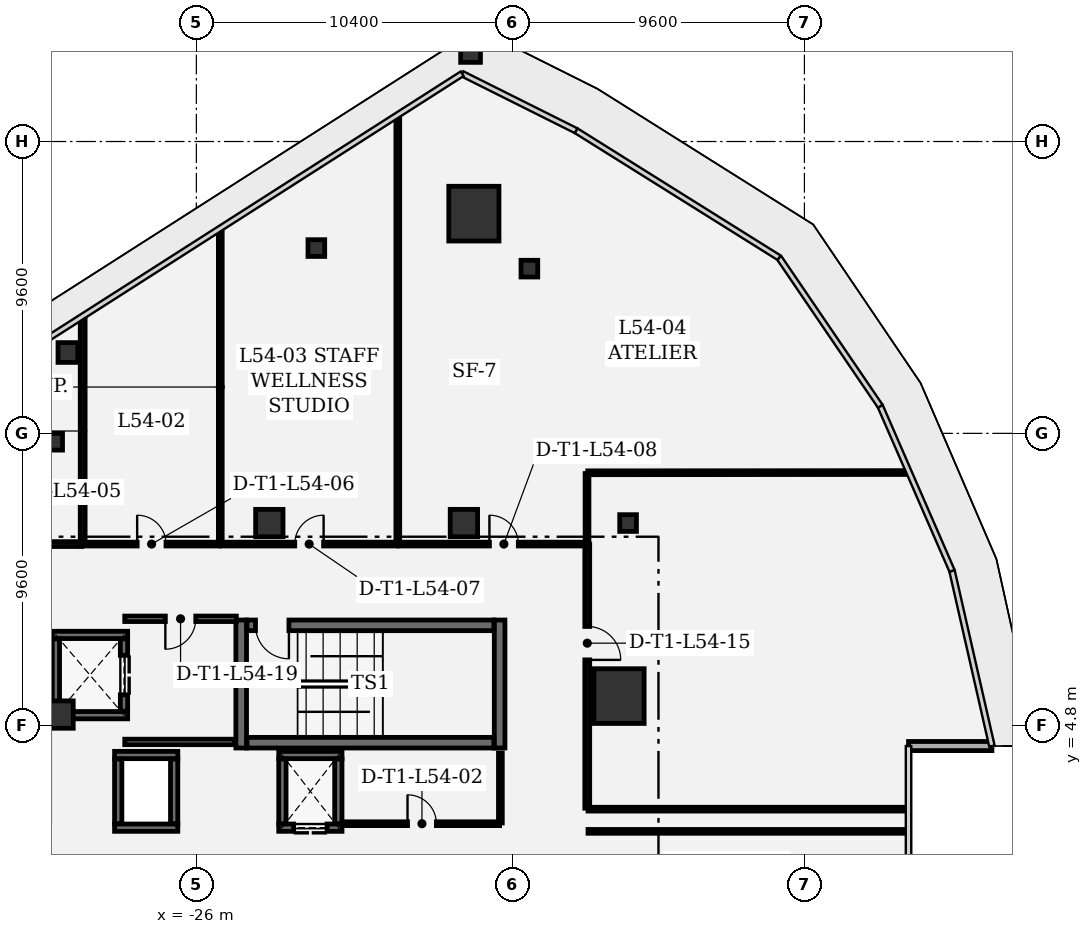
"""IFC4 building model, lengths in metres.
Left out: names, types, materials, properties, quantities, classifications, styles, units other than length and angle.
Written with IfcOpenShell. Run it as: python <this file> out.ifc"""

import sys

from ifc_helpers import new_model, si_unit, direction, frame, frame_2d, origin, origin_2d, place, context, subcontext, project, spatial, rectangle, extrude, element, fill, save


model = new_model("IFC4")
c1 = context("Model", 3, precision=1e-05, world=origin(), true_north=direction((0.0, 1.0)))
c2 = subcontext(c1, "Body", "Model", "MODEL_VIEW")
j1 = project(units=[si_unit("LENGTHUNIT", "METRE"), si_unit("PLANEANGLEUNIT", "RADIAN")], contexts=[c1])
p1 = place(None, origin())
s1 = spatial("IfcSite", under=j1, at=p1, CompositionType="ELEMENT")
p2 = place(p1, origin())
s2 = spatial("IfcBuilding", under=s1, at=p2, CompositionType="ELEMENT")
p3 = place(p2, frame((0.0, 0.0, 233.4)))
s3 = spatial("IfcBuildingStorey", under=s2, at=p3, CompositionType="ELEMENT", Elevation=233.4)
for number, where, z_axis, x_axis in (
    (1, (-12.097, 5.758, 0.0), (0.0, 0.0, 1.0), (1.0, 0.0, 0.0)),
    (2, (-16.872, 21.627, 0.0), (0.0, 0.0, 1.0), (1.0, 0.0, 0.0)),
):
    element("IfcColumn", number, at=place(p3, frame(where, z_axis=z_axis, x_axis=x_axis)), inside=s3, PredefinedType="COLUMN", context=c2, shape_type="SweptSolid", body=[
        extrude(rectangle(XDim=1.65, YDim=1.8, at=origin_2d()), origin(), (0.0, 0.0, 1.0), 4.05),
    ])
for number, where, z_axis, x_axis in (
    (3, (-23.6, 11.45, 0.0), (0.0, 0.0, 1.0), (1.0, 0.0, 0.0)),
    (4, (-17.2, 11.45, 0.0), (0.0, 0.0, 1.0), (1.0, 0.0, 0.0)),
    (5, (-30.5, 5.15, 0.0), (0.0, 0.0, 1.0), (1.0, 0.0, 0.0)),
):
    element("IfcColumn", number, at=place(p3, frame(where, z_axis=z_axis, x_axis=x_axis)), inside=s3, PredefinedType="COLUMN", context=c2, shape_type="SweptSolid", body=[
        extrude(rectangle(XDim=0.9, YDim=0.9, at=origin_2d()), origin(), (0.0, 0.0, 1.0), 4.05),
    ])
for number, where, z_axis, x_axis in (
    (6, (-16.981, 26.929, 0.0), (0.0, 0.0, 1.0), (1.0, 0.0, 0.0)),
    (7, (-30.225, 17.06, 0.0), (0.0, 0.0, 1.0), (1.0, 0.0, 0.0)),
):
    element("IfcColumn", number, at=place(p3, frame(where, z_axis=z_axis, x_axis=x_axis)), inside=s3, PredefinedType="COLUMN", context=c2, shape_type="SweptSolid", body=[
        extrude(rectangle(XDim=0.65, YDim=0.65, at=origin_2d()), origin(), (0.0, 0.0, 1.0), 4.05),
    ])
for number, where, z_axis, x_axis in (
    (8, (-22.053, 20.495, 0.0), (0.0, 0.0, 1.0), (1.0, 0.0, 0.0)),
    (9, (-30.677, 14.124, 0.0), (0.0, 0.0, 1.0), (1.0, 0.0, 0.0)),
    (10, (-15.046, 19.818, 0.0), (0.0, 0.0, 1.0), (1.0, 0.0, 0.0)),
    (11, (-11.8, 11.45, 0.0), (0.0, 0.0, 1.0), (1.0, 0.0, 0.0)),
):
    element("IfcColumn", number, at=place(p3, frame(where, z_axis=z_axis, x_axis=x_axis)), inside=s3, PredefinedType="COLUMN", context=c2, shape_type="SweptSolid", body=[
        extrude(rectangle(XDim=0.55, YDim=0.55, at=origin_2d()), origin(), (0.0, 0.0, 1.0), 4.05),
    ])
p4 = place(p3, frame((-2.575, 4.115, 0.0), z_axis=(0.0, 0.0, 1.0), x_axis=(1.0, 0.0, 0.0)))
e12 = element("IfcWall", 12, at=p4, inside=s3, PredefinedType="SOLIDWALL", context=c2, shape_type="SweptSolid", body=[
    extrude(rectangle(XDim=2.743, YDim=0.3, at=frame_2d((1.372, 0.0))), origin(), (0.0, 0.0, 1.0), 3.78),
])
for number, where, z_axis, x_axis in (
    (13, (-24.525, 8.26, 0.0), (0.0, 0.0, 1.0), (0.0, -1.0, 0.0)),
    (14, (-16.025, 4.05, 0.0), (0.0, 0.0, 1.0), (0.0, 1.0, 0.0)),
):
    element("IfcWall", number, at=place(p3, frame(where, z_axis=z_axis, x_axis=x_axis)), inside=s3, PredefinedType="SHEAR", context=c2, shape_type="SweptSolid", body=[
        extrude(rectangle(XDim=4.21, YDim=0.35, at=frame_2d((2.105, 0.0))), origin(), (0.0, 0.0, 1.0), 3.78),
    ])
p5 = place(p3, frame((-24.335, 4.225, 0.0), z_axis=(0.0, 0.0, 1.0), x_axis=(1.0, 0.0, 0.0)))
e15 = element("IfcWall", 15, at=p5, inside=s3, PredefinedType="SHEAR", context=c2, shape_type="SweptSolid", body=[
    extrude(rectangle(XDim=8.12, YDim=0.35, at=frame_2d((4.06, 0.0))), origin(), (0.0, 0.0, 1.0), 3.78),
])
p6 = place(p3, frame((-16.215, 8.085, 0.0), z_axis=(0.0, 0.0, 1.0), x_axis=(-1.0, 0.0, 0.0)))
e16 = element("IfcWall", 16, at=p6, inside=s3, PredefinedType="SHEAR", context=c2, shape_type="SweptSolid", body=[
    extrude(rectangle(XDim=8.12, YDim=0.35, at=frame_2d((4.06, 0.0))), origin(), (0.0, 0.0, 1.0), 3.78),
])
p7 = place(p6, frame((6.74, 0.0, 0.0)))
e17 = element("IfcOpeningElement", 17, at=p7, cuts=e16, PredefinedType="OPENING", context=c2, shape_type="SweptSolid", body=[
    extrude(rectangle(XDim=1.1, YDim=2.2, at=frame_2d((0.55, 1.1))), frame((0.0, 0.185, 0.0), z_axis=(0.0, -1.0, 0.0), x_axis=(1.0, 0.0, 0.0)), (0.0, 0.0, 1.0), 0.37),
])
for number, where, z_axis, x_axis in (
    (18, (-28.26, 5.13, 0.0), (0.0, 0.0, 1.0), (-1.0, 0.0, 0.0)),
    (19, (-30.74, 7.77, 0.0), (0.0, 0.0, 1.0), (1.0, 0.0, 0.0)),
):
    element("IfcWall", number, at=place(p3, frame(where, z_axis=z_axis, x_axis=x_axis)), inside=s3, PredefinedType="SHEAR", context=c2, shape_type="SweptSolid", body=[
        extrude(rectangle(XDim=2.48, YDim=0.24, at=frame_2d((1.24, 0.0))), origin(), (0.0, 0.0, 1.0), 3.78),
    ])
p8 = place(p3, frame((-30.62, 5.262, 0.0), z_axis=(0.0, 0.0, 1.0), x_axis=(0.0, 1.0, 0.0)))
e20 = element("IfcWall", 20, at=p8, inside=s3, PredefinedType="SHEAR", context=c2, shape_type="SweptSolid", body=[
    extrude(rectangle(XDim=2.376, YDim=0.24, at=frame_2d((1.188, 0.0))), origin(), (0.0, 0.0, 1.0), 3.78),
])
p9 = place(p3, frame((-28.38, 7.638, 0.0), z_axis=(0.0, 0.0, 1.0), x_axis=(0.0, -1.0, 0.0)))
e21 = element("IfcWall", 21, at=p9, inside=s3, PredefinedType="SHEAR", context=c2, shape_type="SweptSolid", body=[
    extrude(rectangle(XDim=2.376, YDim=0.24, at=frame_2d((1.188, 0.0))), origin(), (0.0, 0.0, 1.0), 3.78),
])
p10 = place(p9, frame((0.538, 0.0, 0.0)))
e22 = element("IfcOpeningElement", 22, at=p10, cuts=e21, PredefinedType="OPENING", context=c2, shape_type="SweptSolid", body=[
    extrude(rectangle(XDim=1.3, YDim=2.3, at=frame_2d((0.65, 1.15))), frame((0.0, 0.13, 0.0), z_axis=(0.0, -1.0, 0.0), x_axis=(1.0, 0.0, 0.0)), (0.0, 0.0, 1.0), 0.26),
])
for number, where, z_axis, x_axis in (
    (23, (-26.61, 1.43, 0.0), (0.0, 0.0, 1.0), (-1.0, 0.0, 0.0)),
    (24, (-28.69, 3.82, 0.0), (0.0, 0.0, 1.0), (1.0, 0.0, 0.0)),
):
    element("IfcWall", number, at=place(p3, frame(where, z_axis=z_axis, x_axis=x_axis)), inside=s3, PredefinedType="SHEAR", context=c2, shape_type="SweptSolid", body=[
        extrude(rectangle(XDim=2.08, YDim=0.24, at=frame_2d((1.04, 0.0))), origin(), (0.0, 0.0, 1.0), 3.78),
    ])
for number, where, z_axis, x_axis in (
    (25, (-28.57, 1.562, 0.0), (0.0, 0.0, 1.0), (0.0, 1.0, 0.0)),
    (26, (-26.73, 3.688, 0.0), (0.0, 0.0, 1.0), (0.0, -1.0, 0.0)),
):
    element("IfcWall", number, at=place(p3, frame(where, z_axis=z_axis, x_axis=x_axis)), inside=s3, PredefinedType="SHEAR", context=c2, shape_type="SweptSolid", body=[
        extrude(rectangle(XDim=2.126, YDim=0.24, at=frame_2d((1.063, 0.0))), origin(), (0.0, 0.0, 1.0), 3.78),
    ])
p11 = place(p3, frame((-21.21, 1.43, 0.0), z_axis=(0.0, 0.0, 1.0), x_axis=(-1.0, 0.0, 0.0)))
e27 = element("IfcWall", 27, at=p11, inside=s3, PredefinedType="SHEAR", context=c2, shape_type="SweptSolid", body=[
    extrude(rectangle(XDim=2.08, YDim=0.24, at=frame_2d((1.04, 0.0))), origin(), (0.0, 0.0, 1.0), 3.78),
])
p12 = place(p11, frame((0.49, 0.0, 0.0)))
e28 = element("IfcOpeningElement", 28, at=p12, cuts=e27, PredefinedType="OPENING", context=c2, shape_type="SweptSolid", body=[
    extrude(rectangle(XDim=1.1, YDim=2.2, at=frame_2d((0.55, 1.1))), frame((0.0, 0.13, 0.0), z_axis=(0.0, -1.0, 0.0), x_axis=(1.0, 0.0, 0.0)), (0.0, 0.0, 1.0), 0.26),
])
p13 = place(p3, frame((-23.29, 3.82, 0.0), z_axis=(0.0, 0.0, 1.0), x_axis=(1.0, 0.0, 0.0)))
e29 = element("IfcWall", 29, at=p13, inside=s3, PredefinedType="SHEAR", context=c2, shape_type="SweptSolid", body=[
    extrude(rectangle(XDim=2.08, YDim=0.24, at=frame_2d((1.04, 0.0))), origin(), (0.0, 0.0, 1.0), 3.78),
])
for number, where, z_axis, x_axis in (
    (30, (-23.17, 1.562, 0.0), (0.0, 0.0, 1.0), (0.0, 1.0, 0.0)),
    (31, (-21.33, 3.688, 0.0), (0.0, 0.0, 1.0), (0.0, -1.0, 0.0)),
):
    element("IfcWall", number, at=place(p3, frame(where, z_axis=z_axis, x_axis=x_axis)), inside=s3, PredefinedType="SHEAR", context=c2, shape_type="SweptSolid", body=[
        extrude(rectangle(XDim=2.126, YDim=0.24, at=frame_2d((1.063, 0.0))), origin(), (0.0, 0.0, 1.0), 3.78),
    ])
p14 = place(p3, frame((-28.355, 4.25, 0.0), z_axis=(0.0, 0.0, 1.0), x_axis=(1.0, 0.0, 0.0)))
e32 = element("IfcWall", 32, at=p14, inside=s3, PredefinedType="PARTITIONING", context=c2, shape_type="SweptSolid", body=[
    extrude(rectangle(XDim=3.622, YDim=0.18, at=frame_2d((1.811, 0.0))), origin(), (0.0, 0.0, 1.0), 3.78),
])
p15 = place(p3, frame((-24.684, 8.3, 0.0), z_axis=(0.0, 0.0, 1.0), x_axis=(-1.0, 0.0, 0.0)))
e33 = element("IfcWall", 33, at=p15, inside=s3, PredefinedType="PARTITIONING", context=c2, shape_type="SweptSolid", body=[
    extrude(rectangle(XDim=3.671, YDim=0.18, at=frame_2d((1.835, 0.0))), origin(), (0.0, 0.0, 1.0), 3.78),
])
p16 = place(p15, frame((1.335, 0.0, 0.0)))
e34 = element("IfcOpeningElement", 34, at=p16, cuts=e33, PredefinedType="OPENING", context=c2, shape_type="SweptSolid", body=[
    extrude(rectangle(XDim=1.0, YDim=2.15, at=frame_2d((0.5, 1.075))), frame((0.0, 0.1, 0.0), z_axis=(0.0, -1.0, 0.0), x_axis=(1.0, 0.0, 0.0)), (0.0, 0.0, 1.0), 0.2),
])
p17 = place(p3, frame((-21.134, 1.56, 0.0), z_axis=(0.0, 0.0, 1.0), x_axis=(1.0, 0.0, 0.0)))
e35 = element("IfcWall", 35, at=p17, inside=s3, PredefinedType="PARTITIONING", context=c2, shape_type="SweptSolid", body=[
    extrude(rectangle(XDim=5.109, YDim=0.125, at=frame_2d((2.554, 0.0))), origin(), (0.0, 0.0, 1.0), 3.78),
])
p18 = place(p17, frame((2.079, 0.0, 0.0)))
e36 = element("IfcOpeningElement", 36, at=p18, cuts=e35, PredefinedType="OPENING", context=c2, shape_type="SweptSolid", body=[
    extrude(rectangle(XDim=0.95, YDim=2.15, at=frame_2d((0.475, 1.075))), frame((0.0, 0.073, 0.0), z_axis=(0.0, -1.0, 0.0), x_axis=(1.0, 0.0, 0.0)), (0.0, 0.0, 1.0), 0.145),
])
p19 = place(p3, frame((-16.0, 1.585, 0.0), z_axis=(0.0, 0.0, 1.0), x_axis=(0.0, 1.0, 0.0)))
e37 = element("IfcWall", 37, at=p19, inside=s3, PredefinedType="PARTITIONING", context=c2, shape_type="SweptSolid", body=[
    extrude(rectangle(XDim=2.302, YDim=0.125, at=frame_2d((1.151, 0.0))), origin(), (0.0, 0.0, 1.0), 3.78),
])
p20 = place(p3, frame((-34.625, 10.758, 0.0), z_axis=(0.0, 0.0, 1.0), x_axis=(1.0, 0.0, 0.0)))
e38 = element("IfcWall", 38, at=p20, inside=s3, PredefinedType="PARTITIONING", context=c2, shape_type="SweptSolid", body=[
    extrude(rectangle(XDim=4.861, YDim=0.16, at=frame_2d((2.431, 0.0))), origin(), (0.0, 0.0, 1.0), 3.0),
])
p21 = place(p20, frame((1.881, 0.0, 0.0)))
e39 = element("IfcOpeningElement", 39, at=p21, cuts=e38, PredefinedType="OPENING", context=c2, shape_type="SweptSolid", body=[
    extrude(rectangle(XDim=1.1, YDim=2.15, at=frame_2d((0.55, 1.075))), frame((0.0, 0.09, 0.0), z_axis=(0.0, -1.0, 0.0), x_axis=(1.0, 0.0, 0.0)), (0.0, 0.0, 1.0), 0.18),
])
p22 = place(p3, frame((-29.739, 10.783, 0.0), z_axis=(0.0, 0.0, 1.0), x_axis=(0.0, 1.0, 0.0)))
e40 = element("IfcWall", 40, at=p22, inside=s3, PredefinedType="PARTITIONING", context=c2, shape_type="SweptSolid", body=[
    extrude(rectangle(XDim=7.389, YDim=0.16, at=frame_2d((3.694, 0.0))), origin(), (0.0, 0.0, 1.0), 3.78),
])
p23 = place(p3, frame((-29.706, 10.758, 0.0), z_axis=(0.0, 0.0, 1.0), x_axis=(1.0, 0.0, 0.0)))
e41 = element("IfcWall", 41, at=p23, inside=s3, PredefinedType="PARTITIONING", context=c2, shape_type="SweptSolid", body=[
    extrude(rectangle(XDim=4.468, YDim=0.125, at=frame_2d((2.234, 0.0))), origin(), (0.0, 0.0, 1.0), 3.78),
])
p24 = place(p23, frame((1.759, 0.0, 0.0)))
e42 = element("IfcOpeningElement", 42, at=p24, cuts=e41, PredefinedType="OPENING", context=c2, shape_type="SweptSolid", body=[
    extrude(rectangle(XDim=0.95, YDim=2.15, at=frame_2d((0.475, 1.075))), frame((0.0, 0.073, 0.0), z_axis=(0.0, -1.0, 0.0), x_axis=(1.0, 0.0, 0.0)), (0.0, 0.0, 1.0), 0.145),
])
p25 = place(p3, frame((-25.213, 10.783, 0.0), z_axis=(0.0, 0.0, 1.0), x_axis=(0.0, 1.0, 0.0)))
e43 = element("IfcWall", 43, at=p25, inside=s3, PredefinedType="PARTITIONING", context=c2, shape_type="SweptSolid", body=[
    extrude(rectangle(XDim=10.281, YDim=0.125, at=frame_2d((5.141, 0.0))), origin(), (0.0, 0.0, 1.0), 3.78),
])
p26 = place(p3, frame((-25.18, 10.758, 0.0), z_axis=(0.0, 0.0, 1.0), x_axis=(1.0, 0.0, 0.0)))
e44 = element("IfcWall", 44, at=p26, inside=s3, PredefinedType="PARTITIONING", context=c2, shape_type="SweptSolid", body=[
    extrude(rectangle(XDim=5.781, YDim=0.125, at=frame_2d((2.89, 0.0))), origin(), (0.0, 0.0, 1.0), 3.78),
])
p27 = place(p26, frame((2.415, 0.0, 0.0)))
e45 = element("IfcOpeningElement", 45, at=p27, cuts=e44, PredefinedType="OPENING", context=c2, shape_type="SweptSolid", body=[
    extrude(rectangle(XDim=0.95, YDim=2.15, at=frame_2d((0.475, 1.075))), frame((0.0, 0.073, 0.0), z_axis=(0.0, -1.0, 0.0), x_axis=(1.0, 0.0, 0.0)), (0.0, 0.0, 1.0), 0.145),
])
p28 = place(p3, frame((-19.374, 10.783, 0.0), z_axis=(0.0, 0.0, 1.0), x_axis=(0.0, 1.0, 0.0)))
e46 = element("IfcWall", 46, at=p28, inside=s3, PredefinedType="PARTITIONING", context=c2, shape_type="SweptSolid", body=[
    extrude(rectangle(XDim=14.013, YDim=0.125, at=frame_2d((7.006, 0.0))), origin(), (0.0, 0.0, 1.0), 2.977),
])
p29 = place(p3, frame((-19.341, 10.758, 0.0), z_axis=(0.0, 0.0, 1.0), x_axis=(1.0, 0.0, 0.0)))
e47 = element("IfcWall", 47, at=p29, inside=s3, PredefinedType="PARTITIONING", context=c2, shape_type="SweptSolid", body=[
    extrude(rectangle(XDim=6.166, YDim=0.125, at=frame_2d((3.083, 0.0))), origin(), (0.0, 0.0, 1.0), 3.344),
])
p30 = place(p29, frame((2.981, 0.0, 0.0)))
e48 = element("IfcOpeningElement", 48, at=p30, cuts=e47, PredefinedType="OPENING", context=c2, shape_type="SweptSolid", body=[
    extrude(rectangle(XDim=0.95, YDim=2.15, at=frame_2d((0.475, 1.075))), frame((0.0, 0.073, 0.0), z_axis=(0.0, -1.0, 0.0), x_axis=(1.0, 0.0, 0.0)), (0.0, 0.0, 1.0), 0.145),
])
p31 = place(p3, frame((-13.15, 13.078, 0.0), z_axis=(0.0, 0.0, 1.0), x_axis=(0.0, -1.0, 0.0)))
e49 = element("IfcWall", 49, at=p31, inside=s3, PredefinedType="PARTITIONING", context=c2, shape_type="SweptSolid", body=[
    extrude(rectangle(XDim=2.295, YDim=0.125, at=frame_2d((1.147, 0.0))), origin(), (0.0, 0.0, 1.0), 3.78),
])
p32 = place(p3, frame((-13.125, 13.103, 0.0), z_axis=(0.0, 0.0, 1.0), x_axis=(0.999999739767, 0.000721433371, 0.0)))
e50 = element("IfcWall", 50, at=p32, inside=s3, PredefinedType="PARTITIONING", context=c2, shape_type="SweptSolid", body=[
    extrude(rectangle(XDim=10.491, YDim=0.125, at=frame_2d((5.245, 0.0))), origin(), (0.0, 0.0, 1.0), 3.78),
])
for number, where, z_axis, x_axis in (
    (51, (-2.656, 2.038, 0.0), (0.0, 0.0, 1.0), (-1.0, 0.0, 0.0)),
    (52, (-2.656, 1.308, 0.0), (0.0, 0.0, 1.0), (-1.0, 0.0, 0.0)),
):
    element("IfcWall", number, at=place(p3, frame(where, z_axis=z_axis, x_axis=x_axis)), inside=s3, PredefinedType="PARTITIONING", context=c2, shape_type="SweptSolid", body=[
        extrude(rectangle(XDim=10.462, YDim=0.125, at=frame_2d((5.231, 0.0))), origin(), (0.0, 0.0, 1.0), 3.78),
    ])
p33 = place(p3, frame((-13.142, 10.758, 0.0), z_axis=(0.0, 0.0, 1.0), x_axis=(0.0, -1.0, 0.0)))
e53 = element("IfcWall", 53, at=p33, inside=s3, PredefinedType="PARTITIONING", context=c2, shape_type="SweptSolid", body=[
    extrude(rectangle(XDim=8.687, YDim=0.16, at=frame_2d((4.344, 0.0))), origin(), (0.0, 0.0, 1.0), 3.0),
])
p34 = place(p33, frame((2.71, 0.0, 0.0)))
e54 = element("IfcOpeningElement", 54, at=p34, cuts=e53, PredefinedType="OPENING", context=c2, shape_type="SweptSolid", body=[
    extrude(rectangle(XDim=1.1, YDim=2.15, at=frame_2d((0.55, 1.075))), frame((0.0, 0.09, 0.0), z_axis=(0.0, -1.0, 0.0), x_axis=(1.0, 0.0, 0.0)), (0.0, 0.0, 1.0), 0.18),
])
p35 = place(p7, origin())
e55 = element("IfcDoor", 55, at=p35, inside=s3, OperationType="SINGLE_SWING_LEFT", PredefinedType="DOOR", context=c2, shape_type="SweptSolid", body=[
    extrude(rectangle(XDim=1.1, YDim=2.2, at=frame_2d((0.55, 1.1))), frame((0.0, 0.025, 0.0), z_axis=(0.0, -1.0, 0.0), x_axis=(1.0, 0.0, 0.0)), (0.0, 0.0, 1.0), 0.05),
])
fill(e17, e55)
p36 = place(p10, origin())
e56 = element("IfcDoor", 56, at=p36, inside=s3, OperationType="DOUBLE_DOOR_SLIDING", PredefinedType="DOOR", context=c2, shape_type="SweptSolid", body=[
    extrude(rectangle(XDim=1.3, YDim=2.3, at=frame_2d((0.65, 1.15))), frame((0.0, 0.025, 0.0), z_axis=(0.0, -1.0, 0.0), x_axis=(1.0, 0.0, 0.0)), (0.0, 0.0, 1.0), 0.05),
])
fill(e22, e56)
p37 = place(p12, origin())
e57 = element("IfcDoor", 57, at=p37, inside=s3, OperationType="DOUBLE_DOOR_SLIDING", PredefinedType="DOOR", context=c2, shape_type="SweptSolid", body=[
    extrude(rectangle(XDim=1.1, YDim=2.2, at=frame_2d((0.55, 1.1))), frame((0.0, 0.025, 0.0), z_axis=(0.0, -1.0, 0.0), x_axis=(1.0, 0.0, 0.0)), (0.0, 0.0, 1.0), 0.05),
])
fill(e28, e57)
p38 = place(p18, origin())
e58 = element("IfcDoor", 58, at=p38, inside=s3, OperationType="SINGLE_SWING_LEFT", PredefinedType="DOOR", context=c2, shape_type="SweptSolid", body=[
    extrude(rectangle(XDim=0.95, YDim=2.15, at=frame_2d((0.475, 1.075))), frame((0.0, 0.025, 0.0), z_axis=(0.0, -1.0, 0.0), x_axis=(1.0, 0.0, 0.0)), (0.0, 0.0, 1.0), 0.05),
])
fill(e36, e58)
p39 = place(p24, origin())
e59 = element("IfcDoor", 59, at=p39, inside=s3, OperationType="SINGLE_SWING_LEFT", PredefinedType="DOOR", context=c2, shape_type="SweptSolid", body=[
    extrude(rectangle(XDim=0.95, YDim=2.15, at=frame_2d((0.475, 1.075))), frame((0.0, 0.025, 0.0), z_axis=(0.0, -1.0, 0.0), x_axis=(1.0, 0.0, 0.0)), (0.0, 0.0, 1.0), 0.05),
])
fill(e42, e59)
p40 = place(p27, origin())
e60 = element("IfcDoor", 60, at=p40, inside=s3, OperationType="SINGLE_SWING_RIGHT", PredefinedType="DOOR", context=c2, shape_type="SweptSolid", body=[
    extrude(rectangle(XDim=0.95, YDim=2.15, at=frame_2d((0.475, 1.075))), frame((0.0, 0.025, 0.0), z_axis=(0.0, -1.0, 0.0), x_axis=(1.0, 0.0, 0.0)), (0.0, 0.0, 1.0), 0.05),
])
fill(e45, e60)
p41 = place(p30, origin())
e61 = element("IfcDoor", 61, at=p41, inside=s3, OperationType="SINGLE_SWING_LEFT", PredefinedType="DOOR", context=c2, shape_type="SweptSolid", body=[
    extrude(rectangle(XDim=0.95, YDim=2.15, at=frame_2d((0.475, 1.075))), frame((0.0, 0.025, 0.0), z_axis=(0.0, -1.0, 0.0), x_axis=(1.0, 0.0, 0.0)), (0.0, 0.0, 1.0), 0.05),
])
fill(e48, e61)
p42 = place(p34, origin())
e62 = element("IfcDoor", 62, at=p42, inside=s3, OperationType="SINGLE_SWING_RIGHT", PredefinedType="DOOR", context=c2, shape_type="SweptSolid", body=[
    extrude(rectangle(XDim=1.1, YDim=2.15, at=frame_2d((0.55, 1.075))), frame((0.0, 0.025, 0.0), z_axis=(0.0, -1.0, 0.0), x_axis=(1.0, 0.0, 0.0)), (0.0, 0.0, 1.0), 0.05),
])
fill(e54, e62)
p43 = place(p16, origin())
e63 = element("IfcDoor", 63, at=p43, inside=s3, OperationType="SINGLE_SWING_RIGHT", PredefinedType="DOOR", context=c2, shape_type="SweptSolid", body=[
    extrude(rectangle(XDim=1.0, YDim=2.15, at=frame_2d((0.5, 1.075))), frame((0.0, 0.025, 0.0), z_axis=(0.0, -1.0, 0.0), x_axis=(1.0, 0.0, 0.0)), (0.0, 0.0, 1.0), 0.05),
])
fill(e34, e63)
save(model, sys.argv[1])
